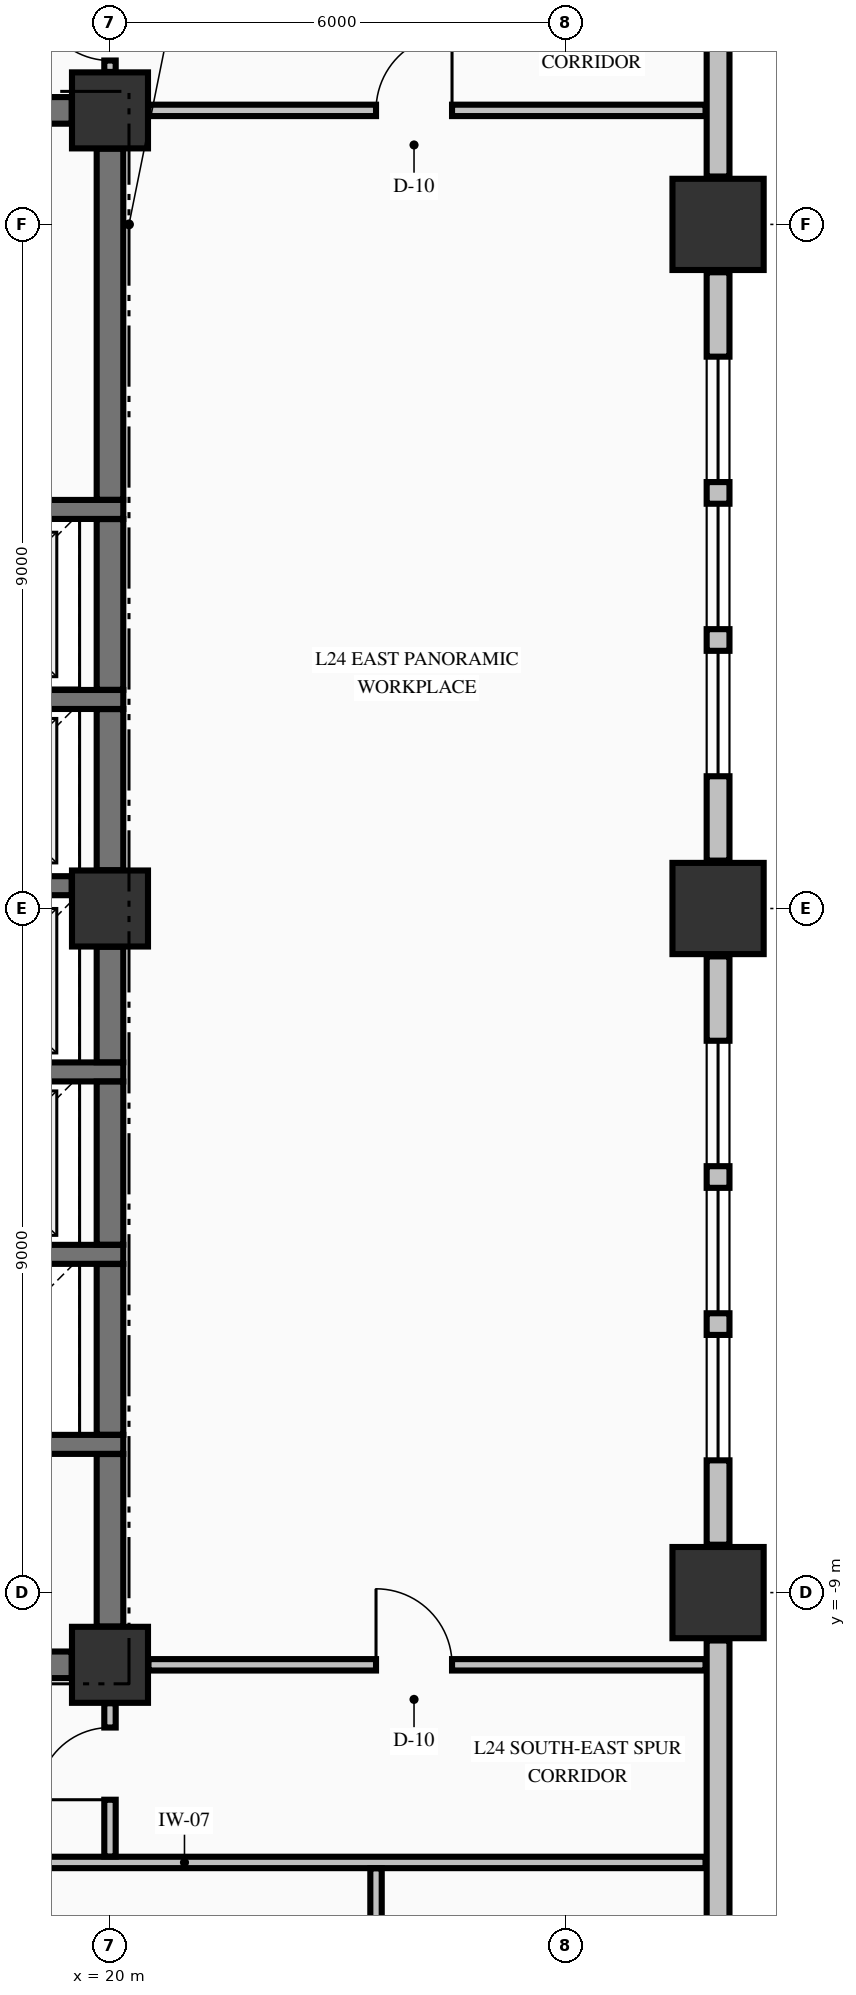
"""IFC4 building model, lengths in metres.
Left out: names, types, materials, properties, quantities, classifications, styles, units other than length and angle.
Written with IfcOpenShell. Run it as: python <this file> out.ifc"""

import sys

from ifc_helpers import new_model, si_unit, direction, frame, frame_2d, origin, origin_2d, place, context, subcontext, project, spatial, rectangle, extrude, element, fill, save


model = new_model("IFC4")
c1 = context("Model", 3, precision=1e-05, world=origin(), true_north=direction((0.0, 1.0)))
c2 = subcontext(c1, "Body", "Model", "MODEL_VIEW")
j1 = project(units=[si_unit("LENGTHUNIT", "METRE"), si_unit("PLANEANGLEUNIT", "RADIAN")], contexts=[c1])
p1 = place(None, origin())
s1 = spatial("IfcSite", under=j1, at=p1, CompositionType="ELEMENT")
p2 = place(p1, origin())
s2 = spatial("IfcBuilding", under=s1, at=p2, CompositionType="ELEMENT")
p3 = place(p2, frame((0.0, 0.0, 98.5)))
s3 = spatial("IfcBuildingStorey", under=s2, at=p3, CompositionType="ELEMENT", Elevation=98.5)
for number, where, z_axis, x_axis in (
    (1, (28.0, -9.0, -0.275), (0.0, 0.0, 1.0), (1.0, 0.0, 0.0)),
    (2, (28.0, 0.0, -0.275), (0.0, 0.0, 1.0), (1.0, 0.0, 0.0)),
    (3, (28.0, 9.0, -0.275), (0.0, 0.0, 1.0), (1.0, 0.0, 0.0)),
):
    element("IfcColumn", number, at=place(p3, frame(where, z_axis=z_axis, x_axis=x_axis)), inside=s3, PredefinedType="COLUMN", context=c2, shape_type="SweptSolid", body=[
        extrude(rectangle(XDim=1.2, YDim=1.2, at=origin_2d()), origin(), (0.0, 0.0, 1.0), 3.595),
    ])
for number, where, z_axis, x_axis in (
    (4, (20.0, -9.95, -0.275), (0.0, 0.0, 1.0), (1.0, 0.0, 0.0)),
    (5, (20.0, 10.5, -0.275), (0.0, 0.0, 1.0), (1.0, 0.0, 0.0)),
    (6, (20.0, 0.0, -0.275), (0.0, 0.0, 1.0), (1.0, 0.0, 0.0)),
):
    element("IfcColumn", number, at=place(p3, frame(where, z_axis=z_axis, x_axis=x_axis)), inside=s3, PredefinedType="COLUMN", context=c2, shape_type="SweptSolid", body=[
        extrude(rectangle(XDim=1.0, YDim=1.0, at=origin_2d()), origin(), (0.0, 0.0, 1.0), 3.595),
    ])
p4 = place(p3, frame((28.0, -20.37, 0.0), z_axis=(0.0, 0.0, 1.0), x_axis=(0.0, 1.0, 0.0)))
e7 = element("IfcWall", 7, at=p4, inside=s3, PredefinedType="STANDARD", context=c2, shape_type="SweptSolid", body=[
    extrude(rectangle(XDim=10.74, YDim=0.3, at=frame_2d((5.37, 0.0))), origin(), (0.0, 0.0, 1.0), 2.712),
])
p5 = place(p3, frame((28.0, -8.37, 0.0), z_axis=(0.0, 0.0, 1.0), x_axis=(0.0, 1.0, 0.0)))
e8 = element("IfcWall", 8, at=p5, inside=s3, PredefinedType="STANDARD", context=c2, shape_type="SweptSolid", body=[
    extrude(rectangle(XDim=7.74, YDim=0.3, at=frame_2d((3.87, 0.0))), origin(), (0.0, 0.0, 1.0), 2.712),
])
p6 = place(p5, frame((1.11, 0.0, 0.8)))
e9 = element("IfcOpeningElement", 9, at=p6, cuts=e8, PredefinedType="OPENING", context=c2, shape_type="SweptSolid", body=[
    extrude(rectangle(XDim=1.65, YDim=1.7, at=frame_2d((0.825, 0.85))), frame((0.0, 0.16, 0.0), z_axis=(0.0, -1.0, 0.0), x_axis=(1.0, 0.0, 0.0)), (0.0, 0.0, 1.0), 0.32),
])
p7 = place(p5, frame((3.045, 0.0, 0.8)))
e10 = element("IfcOpeningElement", 10, at=p7, cuts=e8, PredefinedType="OPENING", context=c2, shape_type="SweptSolid", body=[
    extrude(rectangle(XDim=1.65, YDim=1.7, at=frame_2d((0.825, 0.85))), frame((0.0, 0.16, 0.0), z_axis=(0.0, -1.0, 0.0), x_axis=(1.0, 0.0, 0.0)), (0.0, 0.0, 1.0), 0.32),
])
p8 = place(p5, frame((4.98, 0.0, 0.8)))
e11 = element("IfcOpeningElement", 11, at=p8, cuts=e8, PredefinedType="OPENING", context=c2, shape_type="SweptSolid", body=[
    extrude(rectangle(XDim=1.65, YDim=1.7, at=frame_2d((0.825, 0.85))), frame((0.0, 0.16, 0.0), z_axis=(0.0, -1.0, 0.0), x_axis=(1.0, 0.0, 0.0)), (0.0, 0.0, 1.0), 0.32),
])
p9 = place(p3, frame((28.0, 0.63, 0.0), z_axis=(0.0, 0.0, 1.0), x_axis=(0.0, 1.0, 0.0)))
e12 = element("IfcWall", 12, at=p9, inside=s3, PredefinedType="STANDARD", context=c2, shape_type="SweptSolid", body=[
    extrude(rectangle(XDim=7.74, YDim=0.3, at=frame_2d((3.87, 0.0))), origin(), (0.0, 0.0, 1.0), 2.712),
])
p10 = place(p9, frame((1.11, 0.0, 0.8)))
e13 = element("IfcOpeningElement", 13, at=p10, cuts=e12, PredefinedType="OPENING", context=c2, shape_type="SweptSolid", body=[
    extrude(rectangle(XDim=1.65, YDim=1.7, at=frame_2d((0.825, 0.85))), frame((0.0, 0.16, 0.0), z_axis=(0.0, -1.0, 0.0), x_axis=(1.0, 0.0, 0.0)), (0.0, 0.0, 1.0), 0.32),
])
p11 = place(p9, frame((3.045, 0.0, 0.8)))
e14 = element("IfcOpeningElement", 14, at=p11, cuts=e12, PredefinedType="OPENING", context=c2, shape_type="SweptSolid", body=[
    extrude(rectangle(XDim=1.65, YDim=1.7, at=frame_2d((0.825, 0.85))), frame((0.0, 0.16, 0.0), z_axis=(0.0, -1.0, 0.0), x_axis=(1.0, 0.0, 0.0)), (0.0, 0.0, 1.0), 0.32),
])
p12 = place(p9, frame((4.98, 0.0, 0.8)))
e15 = element("IfcOpeningElement", 15, at=p12, cuts=e12, PredefinedType="OPENING", context=c2, shape_type="SweptSolid", body=[
    extrude(rectangle(XDim=1.65, YDim=1.7, at=frame_2d((0.825, 0.85))), frame((0.0, 0.16, 0.0), z_axis=(0.0, -1.0, 0.0), x_axis=(1.0, 0.0, 0.0)), (0.0, 0.0, 1.0), 0.32),
])
p13 = place(p3, frame((28.0, 9.63, 0.0), z_axis=(0.0, 0.0, 1.0), x_axis=(0.0, 1.0, 0.0)))
e16 = element("IfcWall", 16, at=p13, inside=s3, PredefinedType="STANDARD", context=c2, shape_type="SweptSolid", body=[
    extrude(rectangle(XDim=10.74, YDim=0.3, at=frame_2d((5.37, 0.0))), origin(), (0.0, 0.0, 1.0), 2.712),
])
p14 = place(p3, frame((14.7, -9.95, 0.0), z_axis=(0.0, 0.0, 1.0), x_axis=(1.0, 0.0, 0.0)))
e17 = element("IfcWall", 17, at=p14, inside=s3, PredefinedType="SHEAR", context=c2, shape_type="SweptSolid", body=[
    extrude(rectangle(XDim=4.796, YDim=0.35, at=frame_2d((2.398, 0.0))), origin(), (0.0, 0.0, 1.0), 3.32),
])
p15 = place(p14, frame((0.65, 0.0, 0.0)))
e18 = element("IfcOpeningElement", 18, at=p15, cuts=e17, PredefinedType="OPENING", context=c2, shape_type="SweptSolid", body=[
    extrude(rectangle(XDim=1.2, YDim=2.15, at=frame_2d((0.6, 1.075))), frame((0.0, 0.185, 0.0), z_axis=(0.0, -1.0, 0.0), x_axis=(1.0, 0.0, 0.0)), (0.0, 0.0, 1.0), 0.37),
])
for number, where, z_axis, x_axis in (
    (19, (17.025, -7.05, 0.0), (0.0, 0.0, 1.0), (1.0, 0.0, 0.0)),
    (20, (17.025, -4.55, 0.0), (0.0, 0.0, 1.0), (1.0, 0.0, 0.0)),
    (21, (17.025, -2.15, 0.0), (0.0, 0.0, 1.0), (1.0, 0.0, 0.0)),
):
    element("IfcWall", number, at=place(p3, frame(where, z_axis=z_axis, x_axis=x_axis)), inside=s3, PredefinedType="SOLIDWALL", context=c2, shape_type="SweptSolid", body=[
        extrude(rectangle(XDim=3.15, YDim=0.25, at=frame_2d((1.575, 0.0))), origin(), (0.0, 0.0, 1.0), 3.32),
    ])
p16 = place(p3, frame((17.025, 0.3, 0.0), z_axis=(0.0, 0.0, 1.0), x_axis=(1.0, 0.0, 0.0)))
e22 = element("IfcWall", 22, at=p16, inside=s3, PredefinedType="SOLIDWALL", context=c2, shape_type="SweptSolid", body=[
    extrude(rectangle(XDim=2.471, YDim=0.25, at=frame_2d((1.236, 0.0))), origin(), (0.0, 0.0, 1.0), 3.32),
])
for number, where, z_axis, x_axis in (
    (23, (17.025, 2.75, 0.0), (0.0, 0.0, 1.0), (1.0, 0.0, 0.0)),
    (24, (17.025, 5.25, 0.0), (0.0, 0.0, 1.0), (1.0, 0.0, 0.0)),
):
    element("IfcWall", number, at=place(p3, frame(where, z_axis=z_axis, x_axis=x_axis)), inside=s3, PredefinedType="SOLIDWALL", context=c2, shape_type="SweptSolid", body=[
        extrude(rectangle(XDim=3.15, YDim=0.25, at=frame_2d((1.575, 0.0))), origin(), (0.0, 0.0, 1.0), 3.32),
    ])
p17 = place(p3, frame((14.7, 10.5, 0.0), z_axis=(0.0, 0.0, 1.0), x_axis=(1.0, 0.0, 0.0)))
e25 = element("IfcWall", 25, at=p17, inside=s3, PredefinedType="SHEAR", context=c2, shape_type="SweptSolid", body=[
    extrude(rectangle(XDim=4.796, YDim=0.35, at=frame_2d((2.398, 0.0))), origin(), (0.0, 0.0, 1.0), 3.32),
])
p18 = place(p17, frame((0.65, 0.0, 0.0)))
e26 = element("IfcOpeningElement", 26, at=p18, cuts=e25, PredefinedType="OPENING", context=c2, shape_type="SweptSolid", body=[
    extrude(rectangle(XDim=1.2, YDim=2.15, at=frame_2d((0.6, 1.075))), frame((0.0, 0.185, 0.0), z_axis=(0.0, -1.0, 0.0), x_axis=(1.0, 0.0, 0.0)), (0.0, 0.0, 1.0), 0.37),
])
p19 = place(p17, frame((3.25, 0.0, 0.0)))
e27 = element("IfcOpeningElement", 27, at=p19, cuts=e25, PredefinedType="OPENING", context=c2, shape_type="SweptSolid", body=[
    extrude(rectangle(XDim=0.9, YDim=2.15, at=frame_2d((0.45, 1.075))), frame((0.0, 0.185, 0.0), z_axis=(0.0, -1.0, 0.0), x_axis=(1.0, 0.0, 0.0)), (0.0, 0.0, 1.0), 0.37),
])
p20 = place(p3, frame((-22.835, -12.55, 0.0), z_axis=(0.0, 0.0, 1.0), x_axis=(1.0, 0.0, 0.0)))
e28 = element("IfcWall", 28, at=p20, inside=s3, PredefinedType="PARTITIONING", context=c2, shape_type="SweptSolid", body=[
    extrude(rectangle(XDim=50.67, YDim=0.15, at=frame_2d((25.335, 0.0))), origin(), (0.0, 0.0, 1.0), 3.32),
])
p21 = place(p20, frame((7.01, 0.0, 0.0)))
e29 = element("IfcOpeningElement", 29, at=p21, cuts=e28, PredefinedType="OPENING", context=c2, shape_type="SweptSolid", body=[
    extrude(rectangle(XDim=0.95, YDim=2.15, at=frame_2d((0.475, 1.075))), frame((0.0, 0.085, 0.0), z_axis=(0.0, -1.0, 0.0), x_axis=(1.0, 0.0, 0.0)), (0.0, 0.0, 1.0), 0.17),
])
p22 = place(p20, frame((14.91, 0.0, 0.0)))
e30 = element("IfcOpeningElement", 30, at=p22, cuts=e28, PredefinedType="OPENING", context=c2, shape_type="SweptSolid", body=[
    extrude(rectangle(XDim=1.05, YDim=2.15, at=frame_2d((0.525, 1.075))), frame((0.0, 0.085, 0.0), z_axis=(0.0, -1.0, 0.0), x_axis=(1.0, 0.0, 0.0)), (0.0, 0.0, 1.0), 0.17),
])
p23 = place(p20, frame((24.71, 0.0, 0.0)))
e31 = element("IfcOpeningElement", 31, at=p23, cuts=e28, PredefinedType="OPENING", context=c2, shape_type="SweptSolid", body=[
    extrude(rectangle(XDim=1.05, YDim=2.15, at=frame_2d((0.525, 1.075))), frame((0.0, 0.085, 0.0), z_axis=(0.0, -1.0, 0.0), x_axis=(1.0, 0.0, 0.0)), (0.0, 0.0, 1.0), 0.17),
])
p24 = place(p20, frame((35.91, 0.0, 0.0)))
e32 = element("IfcOpeningElement", 32, at=p24, cuts=e28, PredefinedType="OPENING", context=c2, shape_type="SweptSolid", body=[
    extrude(rectangle(XDim=1.05, YDim=2.15, at=frame_2d((0.525, 1.075))), frame((0.0, 0.085, 0.0), z_axis=(0.0, -1.0, 0.0), x_axis=(1.0, 0.0, 0.0)), (0.0, 0.0, 1.0), 0.17),
])
p25 = place(p3, frame((20.506, -9.95, 0.0), z_axis=(0.0, 0.0, 1.0), x_axis=(1.0, 0.0, 0.0)))
e33 = element("IfcWall", 33, at=p25, inside=s3, PredefinedType="PARTITIONING", context=c2, shape_type="SweptSolid", body=[
    extrude(rectangle(XDim=7.329, YDim=0.15, at=frame_2d((3.665, 0.0))), origin(), (0.0, 0.0, 1.0), 3.32),
])
p26 = place(p25, frame((2.994, 0.0, 0.0)))
e34 = element("IfcOpeningElement", 34, at=p26, cuts=e33, PredefinedType="OPENING", context=c2, shape_type="SweptSolid", body=[
    extrude(rectangle(XDim=1.0, YDim=2.15, at=frame_2d((0.5, 1.075))), frame((0.0, 0.085, 0.0), z_axis=(0.0, -1.0, 0.0), x_axis=(1.0, 0.0, 0.0)), (0.0, 0.0, 1.0), 0.17),
])
p27 = place(p3, frame((20.506, 10.5, 0.0), z_axis=(0.0, 0.0, 1.0), x_axis=(1.0, 0.0, 0.0)))
e35 = element("IfcWall", 35, at=p27, inside=s3, PredefinedType="PARTITIONING", context=c2, shape_type="SweptSolid", body=[
    extrude(rectangle(XDim=7.329, YDim=0.15, at=frame_2d((3.665, 0.0))), origin(), (0.0, 0.0, 1.0), 3.32),
])
p28 = place(p27, frame((2.994, 0.0, 0.0)))
e36 = element("IfcOpeningElement", 36, at=p28, cuts=e35, PredefinedType="OPENING", context=c2, shape_type="SweptSolid", body=[
    extrude(rectangle(XDim=1.0, YDim=2.15, at=frame_2d((0.5, 1.075))), frame((0.0, 0.085, 0.0), z_axis=(0.0, -1.0, 0.0), x_axis=(1.0, 0.0, 0.0)), (0.0, 0.0, 1.0), 0.17),
])
p29 = place(p3, frame((20.0, -9.446, 0.0), z_axis=(0.0, 0.0, 1.0), x_axis=(0.0, 1.0, 0.0)))
e37 = element("IfcWall", 37, at=p29, inside=s3, PredefinedType="SHEAR", context=c2, shape_type="SweptSolid", body=[
    extrude(rectangle(XDim=2.269, YDim=0.35, at=frame_2d((1.135, 0.0))), origin(), (0.0, 0.0, 1.0), 3.32),
])
p30 = place(p3, frame((20.0, -6.923, 0.0), z_axis=(0.0, 0.0, 1.0), x_axis=(0.0, 1.0, 0.0)))
e38 = element("IfcWall", 38, at=p30, inside=s3, PredefinedType="SHEAR", context=c2, shape_type="SweptSolid", body=[
    extrude(rectangle(XDim=2.246, YDim=0.35, at=frame_2d((1.123, 0.0))), origin(), (0.0, 0.0, 1.0), 3.32),
])
p31 = place(p3, frame((20.0, -4.423, 0.0), z_axis=(0.0, 0.0, 1.0), x_axis=(0.0, 1.0, 0.0)))
e39 = element("IfcWall", 39, at=p31, inside=s3, PredefinedType="SHEAR", context=c2, shape_type="SweptSolid", body=[
    extrude(rectangle(XDim=2.146, YDim=0.35, at=frame_2d((1.073, 0.0))), origin(), (0.0, 0.0, 1.0), 3.32),
])
p32 = place(p3, frame((20.0, -2.023, 0.0), z_axis=(0.0, 0.0, 1.0), x_axis=(0.0, 1.0, 0.0)))
e40 = element("IfcWall", 40, at=p32, inside=s3, PredefinedType="SHEAR", context=c2, shape_type="SweptSolid", body=[
    extrude(rectangle(XDim=1.519, YDim=0.35, at=frame_2d((0.76, 0.0))), origin(), (0.0, 0.0, 1.0), 3.32),
])
p33 = place(p3, frame((20.0, 0.504, 0.0), z_axis=(0.0, 0.0, 1.0), x_axis=(0.0, 1.0, 0.0)))
e41 = element("IfcWall", 41, at=p33, inside=s3, PredefinedType="SHEAR", context=c2, shape_type="SweptSolid", body=[
    extrude(rectangle(XDim=2.119, YDim=0.35, at=frame_2d((1.06, 0.0))), origin(), (0.0, 0.0, 1.0), 3.32),
])
p34 = place(p3, frame((20.0, 2.877, 0.0), z_axis=(0.0, 0.0, 1.0), x_axis=(0.0, 1.0, 0.0)))
e42 = element("IfcWall", 42, at=p34, inside=s3, PredefinedType="SHEAR", context=c2, shape_type="SweptSolid", body=[
    extrude(rectangle(XDim=2.246, YDim=0.35, at=frame_2d((1.123, 0.0))), origin(), (0.0, 0.0, 1.0), 3.32),
])
p35 = place(p3, frame((20.0, 5.377, 0.0), z_axis=(0.0, 0.0, 1.0), x_axis=(0.0, 1.0, 0.0)))
e43 = element("IfcWall", 43, at=p35, inside=s3, PredefinedType="SHEAR", context=c2, shape_type="SweptSolid", body=[
    extrude(rectangle(XDim=4.619, YDim=0.35, at=frame_2d((2.31, 0.0))), origin(), (0.0, 0.0, 1.0), 3.32),
])
p36 = place(p3, frame((20.0, -12.472, 0.0), z_axis=(0.0, 0.0, 1.0), x_axis=(0.0, 1.0, 0.0)))
e44 = element("IfcWall", 44, at=p36, inside=s3, PredefinedType="PARTITIONING", context=c2, shape_type="SweptSolid", body=[
    extrude(rectangle(XDim=2.016, YDim=0.15, at=frame_2d((1.008, 0.0))), origin(), (0.0, 0.0, 1.0), 2.81),
])
p37 = place(p36, frame((0.747, 0.0, 0.0)))
e45 = element("IfcOpeningElement", 45, at=p37, cuts=e44, PredefinedType="OPENING", context=c2, shape_type="SweptSolid", body=[
    extrude(rectangle(XDim=0.95, YDim=2.15, at=frame_2d((0.475, 1.075))), frame((0.0, 0.085, 0.0), z_axis=(0.0, -1.0, 0.0), x_axis=(1.0, 0.0, 0.0)), (0.0, 0.0, 1.0), 0.17),
])
p38 = place(p3, frame((20.0, 11.006, 0.0), z_axis=(0.0, 0.0, 1.0), x_axis=(0.0, 1.0, 0.0)))
e46 = element("IfcWall", 46, at=p38, inside=s3, PredefinedType="PARTITIONING", context=c2, shape_type="SweptSolid", body=[
    extrude(rectangle(XDim=1.666, YDim=0.15, at=frame_2d((0.833, 0.0))), origin(), (0.0, 0.0, 1.0), 2.81),
])
p39 = place(p38, frame((0.15, 0.0, 0.0)))
e47 = element("IfcOpeningElement", 47, at=p39, cuts=e46, PredefinedType="OPENING", context=c2, shape_type="SweptSolid", body=[
    extrude(rectangle(XDim=0.95, YDim=2.15, at=frame_2d((0.475, 1.075))), frame((0.0, 0.085, 0.0), z_axis=(0.0, -1.0, 0.0), x_axis=(1.0, 0.0, 0.0)), (0.0, 0.0, 1.0), 0.17),
])
p40 = place(p3, frame((23.5, -20.394, 0.0), z_axis=(0.0, 0.0, 1.0), x_axis=(0.0, 1.0, 0.0)))
e48 = element("IfcWall", 48, at=p40, inside=s3, PredefinedType="PARTITIONING", context=c2, shape_type="SweptSolid", body=[
    extrude(rectangle(XDim=7.766, YDim=0.15, at=frame_2d((3.883, 0.0))), origin(), (0.0, 0.0, 1.0), 3.32),
])
p41 = place(p6, origin())
e49 = element("IfcWindow", 49, at=p41, inside=s3, PartitioningType="SINGLE_PANEL", PredefinedType="WINDOW", context=c2, shape_type="SweptSolid", body=[
    extrude(rectangle(XDim=1.65, YDim=1.7, at=frame_2d((0.825, 0.85))), frame((0.0, 0.03, 0.0), z_axis=(0.0, -1.0, 0.0), x_axis=(1.0, 0.0, 0.0)), (0.0, 0.0, 1.0), 0.06),
])
fill(e9, e49)
p42 = place(p7, origin())
e50 = element("IfcWindow", 50, at=p42, inside=s3, PartitioningType="SINGLE_PANEL", PredefinedType="WINDOW", context=c2, shape_type="SweptSolid", body=[
    extrude(rectangle(XDim=1.65, YDim=1.7, at=frame_2d((0.825, 0.85))), frame((0.0, 0.03, 0.0), z_axis=(0.0, -1.0, 0.0), x_axis=(1.0, 0.0, 0.0)), (0.0, 0.0, 1.0), 0.06),
])
fill(e10, e50)
p43 = place(p8, origin())
e51 = element("IfcWindow", 51, at=p43, inside=s3, PartitioningType="SINGLE_PANEL", PredefinedType="WINDOW", context=c2, shape_type="SweptSolid", body=[
    extrude(rectangle(XDim=1.65, YDim=1.7, at=frame_2d((0.825, 0.85))), frame((0.0, 0.03, 0.0), z_axis=(0.0, -1.0, 0.0), x_axis=(1.0, 0.0, 0.0)), (0.0, 0.0, 1.0), 0.06),
])
fill(e11, e51)
p44 = place(p10, origin())
e52 = element("IfcWindow", 52, at=p44, inside=s3, PartitioningType="SINGLE_PANEL", PredefinedType="WINDOW", context=c2, shape_type="SweptSolid", body=[
    extrude(rectangle(XDim=1.65, YDim=1.7, at=frame_2d((0.825, 0.85))), frame((0.0, 0.03, 0.0), z_axis=(0.0, -1.0, 0.0), x_axis=(1.0, 0.0, 0.0)), (0.0, 0.0, 1.0), 0.06),
])
fill(e13, e52)
p45 = place(p11, origin())
e53 = element("IfcWindow", 53, at=p45, inside=s3, PartitioningType="SINGLE_PANEL", PredefinedType="WINDOW", context=c2, shape_type="SweptSolid", body=[
    extrude(rectangle(XDim=1.65, YDim=1.7, at=frame_2d((0.825, 0.85))), frame((0.0, 0.03, 0.0), z_axis=(0.0, -1.0, 0.0), x_axis=(1.0, 0.0, 0.0)), (0.0, 0.0, 1.0), 0.06),
])
fill(e14, e53)
p46 = place(p12, origin())
e54 = element("IfcWindow", 54, at=p46, inside=s3, PartitioningType="SINGLE_PANEL", PredefinedType="WINDOW", context=c2, shape_type="SweptSolid", body=[
    extrude(rectangle(XDim=1.65, YDim=1.7, at=frame_2d((0.825, 0.85))), frame((0.0, 0.03, 0.0), z_axis=(0.0, -1.0, 0.0), x_axis=(1.0, 0.0, 0.0)), (0.0, 0.0, 1.0), 0.06),
])
fill(e15, e54)
p47 = place(p39, origin())
e55 = element("IfcDoor", 55, at=p47, inside=s3, OperationType="SINGLE_SWING_RIGHT", PredefinedType="DOOR", context=c2, shape_type="SweptSolid", body=[
    extrude(rectangle(XDim=0.95, YDim=2.15, at=frame_2d((0.475, 1.075))), frame((0.0, 0.025, 0.0), z_axis=(0.0, -1.0, 0.0), x_axis=(1.0, 0.0, 0.0)), (0.0, 0.0, 1.0), 0.05),
])
fill(e47, e55)
p48 = place(p37, origin())
e56 = element("IfcDoor", 56, at=p48, inside=s3, OperationType="SINGLE_SWING_LEFT", PredefinedType="DOOR", context=c2, shape_type="SweptSolid", body=[
    extrude(rectangle(XDim=0.95, YDim=2.15, at=frame_2d((0.475, 1.075))), frame((0.0, 0.025, 0.0), z_axis=(0.0, -1.0, 0.0), x_axis=(1.0, 0.0, 0.0)), (0.0, 0.0, 1.0), 0.05),
])
fill(e45, e56)
p49 = place(p28, origin())
e57 = element("IfcDoor", 57, at=p49, inside=s3, OperationType="SINGLE_SWING_RIGHT", PredefinedType="DOOR", context=c2, shape_type="SweptSolid", body=[
    extrude(rectangle(XDim=1.0, YDim=2.15, at=frame_2d((0.5, 1.075))), frame((0.0, 0.025, 0.0), z_axis=(0.0, -1.0, 0.0), x_axis=(1.0, 0.0, 0.0)), (0.0, 0.0, 1.0), 0.05),
])
fill(e36, e57)
p50 = place(p26, origin())
e58 = element("IfcDoor", 58, at=p50, inside=s3, OperationType="SINGLE_SWING_LEFT", PredefinedType="DOOR", context=c2, shape_type="SweptSolid", body=[
    extrude(rectangle(XDim=1.0, YDim=2.15, at=frame_2d((0.5, 1.075))), frame((0.0, 0.025, 0.0), z_axis=(0.0, -1.0, 0.0), x_axis=(1.0, 0.0, 0.0)), (0.0, 0.0, 1.0), 0.05),
])
fill(e34, e58)
save(model, sys.argv[1])
